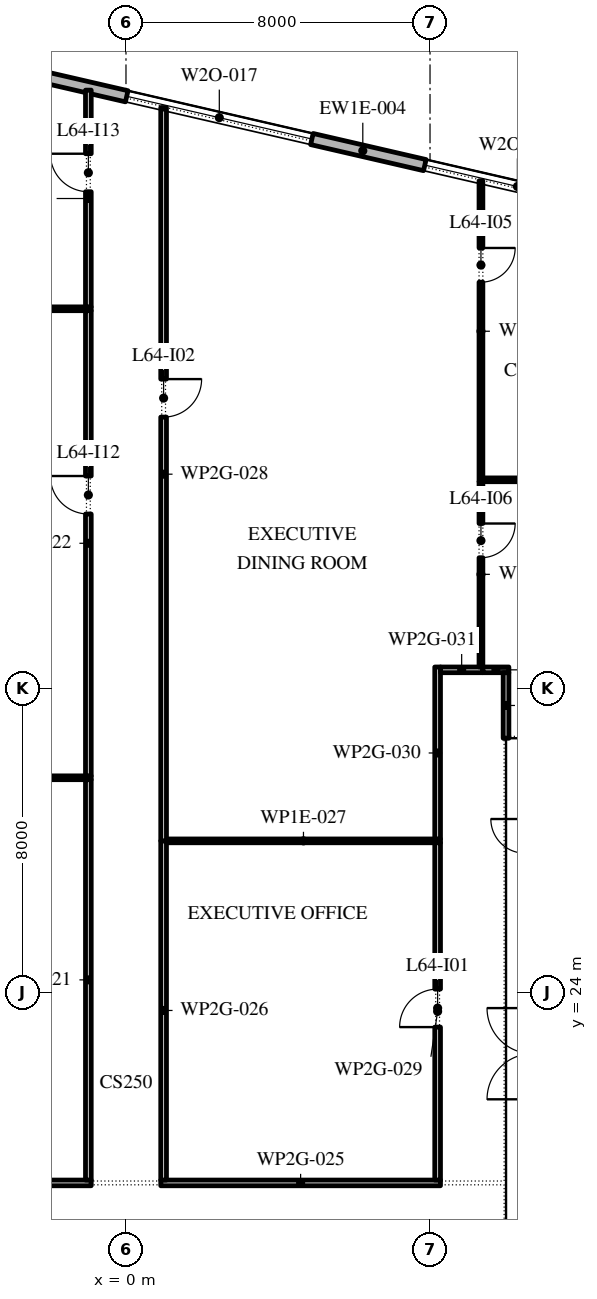
"""IFC4 building model, lengths in metres.
Left out: names, types, materials, properties, quantities, classifications, styles, units other than length and angle.
Written with IfcOpenShell. Run it as: python <this file> out.ifc"""

import sys

from ifc_helpers import new_model, si_unit, direction, frame, frame_2d, origin, place, context, subcontext, project, spatial, rectangle, extrude, element, fill, save


model = new_model("IFC4")
c1 = context("Model", 3, precision=1e-05, world=origin(), true_north=direction((0.0, 1.0)))
c2 = subcontext(c1, "Body", "Model", "MODEL_VIEW")
j1 = project(units=[si_unit("LENGTHUNIT", "METRE"), si_unit("PLANEANGLEUNIT", "RADIAN")], contexts=[c1])
p1 = place(None, origin())
s1 = spatial("IfcSite", under=j1, at=p1, CompositionType="ELEMENT")
p2 = place(p1, origin())
s2 = spatial("IfcBuilding", under=s1, at=p2, CompositionType="ELEMENT")
p3 = place(p2, frame((0.0, 0.0, 293.4)))
s3 = spatial("IfcBuildingStorey", under=s2, at=p3, CompositionType="ELEMENT", Elevation=293.4)
p4 = place(p3, frame((29.616, 40.758, 0.0), z_axis=(0.0, 0.0, 1.0), x_axis=(-0.974370532314, 0.224949029246, 0.0)))
e1 = element("IfcWall", 1, at=p4, inside=s3, PredefinedType="STANDARD", context=c2, shape_type="SweptSolid", body=[
    extrude(rectangle(XDim=48.0, YDim=0.3, at=frame_2d((24.0, 0.0))), origin(), (0.0, 0.0, 1.0), 3.75),
])
p5 = place(p4, frame((1.375, 0.0, 0.45)))
e2 = element("IfcOpeningElement", 2, at=p5, cuts=e1, PredefinedType="OPENING", context=c2, shape_type="SweptSolid", body=[
    extrude(rectangle(XDim=5.0, YDim=2.2, at=frame_2d((2.5, 1.1))), frame((0.0, 0.16, 0.0), z_axis=(0.0, -1.0, 0.0), x_axis=(1.0, 0.0, 0.0)), (0.0, 0.0, 1.0), 0.32),
])
p6 = place(p4, frame((10.575, 0.0, 0.0)))
e3 = element("IfcOpeningElement", 3, at=p6, cuts=e1, PredefinedType="OPENING", context=c2, shape_type="SweptSolid", body=[
    extrude(rectangle(XDim=2.4, YDim=2.65, at=frame_2d((1.2, 1.325))), frame((0.0, 0.16, 0.0), z_axis=(0.0, -1.0, 0.0), x_axis=(1.0, 0.0, 0.0)), (0.0, 0.0, 1.0), 0.32),
])
p7 = place(p4, frame((17.325, 0.0, 0.45)))
e4 = element("IfcOpeningElement", 4, at=p7, cuts=e1, PredefinedType="OPENING", context=c2, shape_type="SweptSolid", body=[
    extrude(rectangle(XDim=5.0, YDim=2.2, at=frame_2d((2.5, 1.1))), frame((0.0, 0.16, 0.0), z_axis=(0.0, -1.0, 0.0), x_axis=(1.0, 0.0, 0.0)), (0.0, 0.0, 1.0), 0.32),
])
p8 = place(p4, frame((25.375, 0.0, 0.45)))
e5 = element("IfcOpeningElement", 5, at=p8, cuts=e1, PredefinedType="OPENING", context=c2, shape_type="SweptSolid", body=[
    extrude(rectangle(XDim=5.0, YDim=2.2, at=frame_2d((2.5, 1.1))), frame((0.0, 0.16, 0.0), z_axis=(0.0, -1.0, 0.0), x_axis=(1.0, 0.0, 0.0)), (0.0, 0.0, 1.0), 0.32),
])
p9 = place(p4, frame((33.425, 0.0, 0.45)))
e6 = element("IfcOpeningElement", 6, at=p9, cuts=e1, PredefinedType="OPENING", context=c2, shape_type="SweptSolid", body=[
    extrude(rectangle(XDim=5.0, YDim=2.2, at=frame_2d((2.5, 1.1))), frame((0.0, 0.16, 0.0), z_axis=(0.0, -1.0, 0.0), x_axis=(1.0, 0.0, 0.0)), (0.0, 0.0, 1.0), 0.32),
])
p10 = place(p4, frame((42.175, 0.0, 0.0)))
e7 = element("IfcOpeningElement", 7, at=p10, cuts=e1, PredefinedType="OPENING", context=c2, shape_type="SweptSolid", body=[
    extrude(rectangle(XDim=2.4, YDim=3.5, at=frame_2d((1.2, 1.75))), frame((0.0, 0.16, 0.0), z_axis=(0.0, -1.0, 0.0), x_axis=(1.0, 0.0, 0.0)), (0.0, 0.0, 1.0), 0.32),
])
p11 = place(p3, frame((-14.19, 42.0, 0.0), z_axis=(0.0, 0.0, 1.0), x_axis=(1.0, 0.0, 0.0)))
e8 = element("IfcWall", 8, at=p11, inside=s3, PredefinedType="PARTITIONING", context=c2, shape_type="SweptSolid", body=[
    extrude(rectangle(XDim=13.275, YDim=0.1, at=frame_2d((6.637, 0.0))), origin(), (0.0, 0.0, 1.0), 3.75),
])
p12 = place(p3, frame((-8.275, 19.0, 0.0), z_axis=(0.0, 0.0, 1.0), x_axis=(1.0, 0.0, 0.0)))
e9 = element("IfcWall", 9, at=p12, inside=s3, PredefinedType="PARTITIONING", context=c2, shape_type="SweptSolid", body=[
    extrude(rectangle(XDim=7.36, YDim=0.15, at=frame_2d((3.68, 0.0))), origin(), (0.0, 0.0, 1.0), 3.75),
])
p13 = place(p3, frame((-8.125, 29.66, 0.0), z_axis=(0.0, 0.0, 1.0), x_axis=(1.0, 0.0, 0.0)))
e10 = element("IfcWall", 10, at=p13, inside=s3, PredefinedType="PARTITIONING", context=c2, shape_type="SweptSolid", body=[
    extrude(rectangle(XDim=7.21, YDim=0.1, at=frame_2d((3.605, 0.0))), origin(), (0.0, 0.0, 1.0), 3.75),
])
p14 = place(p3, frame((-0.99, 19.075, 0.0), z_axis=(0.0, 0.0, 1.0), x_axis=(0.0, 1.0, 0.0)))
e11 = element("IfcWall", 11, at=p14, inside=s3, PredefinedType="PARTITIONING", context=c2, shape_type="SweptSolid", body=[
    extrude(rectangle(XDim=10.535, YDim=0.15, at=frame_2d((5.268, 0.0))), origin(), (0.0, 0.0, 1.0), 3.75),
])
p15 = place(p3, frame((-0.99, 29.71, 0.0), z_axis=(0.0, 0.0, 1.0), x_axis=(0.0, 1.0, 0.0)))
e12 = element("IfcWall", 12, at=p15, inside=s3, PredefinedType="PARTITIONING", context=c2, shape_type="SweptSolid", body=[
    extrude(rectangle(XDim=12.24, YDim=0.15, at=frame_2d((6.12, 0.0))), origin(), (0.0, 0.0, 1.0), 3.75),
])
p16 = place(p15, frame((6.89, 0.0, 0.0)))
e13 = element("IfcOpeningElement", 13, at=p16, cuts=e12, PredefinedType="OPENING", context=c2, shape_type="SweptSolid", body=[
    extrude(rectangle(XDim=1.0, YDim=2.1, at=frame_2d((0.5, 1.05))), frame((0.0, 0.085, 0.0), z_axis=(0.0, -1.0, 0.0), x_axis=(1.0, 0.0, 0.0)), (0.0, 0.0, 1.0), 0.17),
])
p17 = place(p3, frame((-0.99, 42.05, 0.0), z_axis=(0.0, 0.0, 1.0), x_axis=(0.0, 1.0, 0.0)))
e14 = element("IfcWall", 14, at=p17, inside=s3, PredefinedType="PARTITIONING", context=c2, shape_type="SweptSolid", body=[
    extrude(rectangle(XDim=5.703, YDim=0.15, at=frame_2d((2.852, 0.0))), origin(), (0.0, 0.0, 1.0), 3.75),
])
p18 = place(p17, frame((3.03, 0.0, 0.0)))
e15 = element("IfcOpeningElement", 15, at=p18, cuts=e14, PredefinedType="OPENING", context=c2, shape_type="SweptSolid", body=[
    extrude(rectangle(XDim=1.0, YDim=2.1, at=frame_2d((0.5, 1.05))), frame((0.0, 0.085, 0.0), z_axis=(0.0, -1.0, 0.0), x_axis=(1.0, 0.0, 0.0)), (0.0, 0.0, 1.0), 0.17),
])
p19 = place(p3, frame((0.915, 19.0, 0.0), z_axis=(0.0, 0.0, 1.0), x_axis=(1.0, 0.0, 0.0)))
e16 = element("IfcWall", 16, at=p19, inside=s3, PredefinedType="PARTITIONING", context=c2, shape_type="SweptSolid", body=[
    extrude(rectangle(XDim=7.36, YDim=0.15, at=frame_2d((3.68, 0.0))), origin(), (0.0, 0.0, 1.0), 3.75),
])
p20 = place(p3, frame((0.99, 28.0, 0.0), z_axis=(0.0, 0.0, 1.0), x_axis=(0.0, -1.0, 0.0)))
e17 = element("IfcWall", 17, at=p20, inside=s3, PredefinedType="PARTITIONING", context=c2, shape_type="SweptSolid", body=[
    extrude(rectangle(XDim=8.925, YDim=0.15, at=frame_2d((4.462, 0.0))), origin(), (0.0, 0.0, 1.0), 3.75),
])
p21 = place(p3, frame((1.065, 28.0, 0.0), z_axis=(0.0, 0.0, 1.0), x_axis=(1.0, 0.0, 0.0)))
e18 = element("IfcWall", 18, at=p21, inside=s3, PredefinedType="PARTITIONING", context=c2, shape_type="SweptSolid", body=[
    extrude(rectangle(XDim=7.21, YDim=0.1, at=frame_2d((3.605, 0.0))), origin(), (0.0, 0.0, 1.0), 3.75),
])
p22 = place(p3, frame((0.99, 47.296, 0.0), z_axis=(0.0, 0.0, 1.0), x_axis=(0.0, -1.0, 0.0)))
e19 = element("IfcWall", 19, at=p22, inside=s3, PredefinedType="PARTITIONING", context=c2, shape_type="SweptSolid", body=[
    extrude(rectangle(XDim=19.296, YDim=0.15, at=frame_2d((9.648, 0.0))), origin(), (0.0, 0.0, 1.0), 3.75),
])
p23 = place(p22, frame((7.146, 0.0, 0.0)))
e20 = element("IfcOpeningElement", 20, at=p23, cuts=e19, PredefinedType="OPENING", context=c2, shape_type="SweptSolid", body=[
    extrude(rectangle(XDim=1.0, YDim=2.1, at=frame_2d((0.5, 1.05))), frame((0.0, 0.085, 0.0), z_axis=(0.0, -1.0, 0.0), x_axis=(1.0, 0.0, 0.0)), (0.0, 0.0, 1.0), 0.17),
])
p24 = place(p3, frame((8.2, 19.075, 0.0), z_axis=(0.0, 0.0, 1.0), x_axis=(0.0, 1.0, 0.0)))
e21 = element("IfcWall", 21, at=p24, inside=s3, PredefinedType="PARTITIONING", context=c2, shape_type="SweptSolid", body=[
    extrude(rectangle(XDim=8.875, YDim=0.15, at=frame_2d((4.438, 0.0))), origin(), (0.0, 0.0, 1.0), 3.75),
])
p25 = place(p24, frame((4.025, 0.0, 0.0)))
e22 = element("IfcOpeningElement", 22, at=p25, cuts=e21, PredefinedType="OPENING", context=c2, shape_type="SweptSolid", body=[
    extrude(rectangle(XDim=1.0, YDim=2.1, at=frame_2d((0.5, 1.05))), frame((0.0, 0.085, 0.0), z_axis=(0.0, -1.0, 0.0), x_axis=(1.0, 0.0, 0.0)), (0.0, 0.0, 1.0), 0.17),
])
p26 = place(p3, frame((8.2, 28.05, 0.0), z_axis=(0.0, 0.0, 1.0), x_axis=(0.0, 1.0, 0.0)))
e23 = element("IfcWall", 23, at=p26, inside=s3, PredefinedType="PARTITIONING", context=c2, shape_type="SweptSolid", body=[
    extrude(rectangle(XDim=4.525, YDim=0.15, at=frame_2d((2.262, 0.0))), origin(), (0.0, 0.0, 1.0), 3.75),
])
p27 = place(p3, frame((8.275, 32.5, 0.0), z_axis=(0.0, 0.0, 1.0), x_axis=(1.0, 0.0, 0.0)))
e24 = element("IfcWall", 24, at=p27, inside=s3, PredefinedType="PARTITIONING", context=c2, shape_type="SweptSolid", body=[
    extrude(rectangle(XDim=1.115, YDim=0.15, at=frame_2d((0.558, 0.0))), origin(), (0.0, 0.0, 1.0), 3.75),
])
p28 = place(p3, frame((9.39, 32.5, 0.0), z_axis=(0.0, 0.0, 1.0), x_axis=(1.0, 0.0, 0.0)))
e25 = element("IfcWall", 25, at=p28, inside=s3, PredefinedType="PARTITIONING", context=c2, shape_type="SweptSolid", body=[
    extrude(rectangle(XDim=0.685, YDim=0.15, at=frame_2d((0.343, 0.0))), origin(), (0.0, 0.0, 1.0), 3.75),
])
p29 = place(p3, frame((9.34, 37.45, 0.0), z_axis=(0.0, 0.0, 1.0), x_axis=(0.0, -1.0, 0.0)))
e26 = element("IfcWall", 26, at=p29, inside=s3, PredefinedType="PARTITIONING", context=c2, shape_type="SweptSolid", body=[
    extrude(rectangle(XDim=4.875, YDim=0.1, at=frame_2d((2.438, 0.0))), origin(), (0.0, 0.0, 1.0), 3.75),
])
p30 = place(p29, frame((1.1, 0.0, 0.0)))
e27 = element("IfcOpeningElement", 27, at=p30, cuts=e26, PredefinedType="OPENING", context=c2, shape_type="SweptSolid", body=[
    extrude(rectangle(XDim=0.9, YDim=2.1, at=frame_2d((0.45, 1.05))), frame((0.0, 0.06, 0.0), z_axis=(0.0, -1.0, 0.0), x_axis=(1.0, 0.0, 0.0)), (0.0, 0.0, 1.0), 0.12),
])
p31 = place(p3, frame((9.34, 45.368, 0.0), z_axis=(0.0, 0.0, 1.0), x_axis=(0.0, -1.0, 0.0)))
e28 = element("IfcWall", 28, at=p31, inside=s3, PredefinedType="PARTITIONING", context=c2, shape_type="SweptSolid", body=[
    extrude(rectangle(XDim=7.918, YDim=0.1, at=frame_2d((3.959, 0.0))), origin(), (0.0, 0.0, 1.0), 3.75),
])
p32 = place(p31, frame((1.768, 0.0, 0.0)))
e29 = element("IfcOpeningElement", 29, at=p32, cuts=e28, PredefinedType="OPENING", context=c2, shape_type="SweptSolid", body=[
    extrude(rectangle(XDim=0.9, YDim=2.1, at=frame_2d((0.45, 1.05))), frame((0.0, 0.06, 0.0), z_axis=(0.0, -1.0, 0.0), x_axis=(1.0, 0.0, 0.0)), (0.0, 0.0, 1.0), 0.12),
])
p33 = place(p3, frame((10.0, 32.425, 0.0), z_axis=(0.0, 0.0, 1.0), x_axis=(0.0, -1.0, 0.0)))
e30 = element("IfcWall", 30, at=p33, inside=s3, PredefinedType="PARTITIONING", context=c2, shape_type="SweptSolid", body=[
    extrude(rectangle(XDim=1.725, YDim=0.15, at=frame_2d((0.863, 0.0))), origin(), (0.0, 0.0, 1.0), 3.75),
])
p34 = place(p3, frame((22.08, 37.5, 0.0), z_axis=(0.0, 0.0, 1.0), x_axis=(-1.0, 0.0, 0.0)))
e31 = element("IfcWall", 31, at=p34, inside=s3, PredefinedType="PARTITIONING", context=c2, shape_type="SweptSolid", body=[
    extrude(rectangle(XDim=12.69, YDim=0.1, at=frame_2d((6.345, 0.0))), origin(), (0.0, 0.0, 1.0), 3.75),
])
p35 = place(p7, origin())
e32 = element("IfcWindow", 32, at=p35, inside=s3, PartitioningType="DOUBLE_PANEL_VERTICAL", PredefinedType="WINDOW", context=c2, shape_type="SweptSolid", body=[
    extrude(rectangle(XDim=5.0, YDim=2.2, at=frame_2d((2.5, 1.1))), frame((0.0, 0.03, 0.0), z_axis=(0.0, -1.0, 0.0), x_axis=(1.0, 0.0, 0.0)), (0.0, 0.0, 1.0), 0.06),
])
fill(e4, e32)
p36 = place(p8, origin())
e33 = element("IfcWindow", 33, at=p36, inside=s3, PartitioningType="DOUBLE_PANEL_VERTICAL", PredefinedType="WINDOW", context=c2, shape_type="SweptSolid", body=[
    extrude(rectangle(XDim=5.0, YDim=2.2, at=frame_2d((2.5, 1.1))), frame((0.0, 0.03, 0.0), z_axis=(0.0, -1.0, 0.0), x_axis=(1.0, 0.0, 0.0)), (0.0, 0.0, 1.0), 0.06),
])
fill(e5, e33)
p37 = place(p25, origin())
e34 = element("IfcDoor", 34, at=p37, inside=s3, OperationType="SINGLE_SWING_RIGHT", PredefinedType="DOOR", context=c2, shape_type="SweptSolid", body=[
    extrude(rectangle(XDim=1.0, YDim=2.1, at=frame_2d((0.5, 1.05))), frame((0.0, 0.025, 0.0), z_axis=(0.0, -1.0, 0.0), x_axis=(1.0, 0.0, 0.0)), (0.0, 0.0, 1.0), 0.05),
])
fill(e22, e34)
p38 = place(p23, origin())
e35 = element("IfcDoor", 35, at=p38, inside=s3, OperationType="SINGLE_SWING_RIGHT", PredefinedType="DOOR", context=c2, shape_type="SweptSolid", body=[
    extrude(rectangle(XDim=1.0, YDim=2.1, at=frame_2d((0.5, 1.05))), frame((0.0, 0.025, 0.0), z_axis=(0.0, -1.0, 0.0), x_axis=(1.0, 0.0, 0.0)), (0.0, 0.0, 1.0), 0.05),
])
fill(e20, e35)
p39 = place(p32, origin())
e36 = element("IfcDoor", 36, at=p39, inside=s3, OperationType="SINGLE_SWING_RIGHT", PredefinedType="DOOR", context=c2, shape_type="SweptSolid", body=[
    extrude(rectangle(XDim=0.9, YDim=2.1, at=frame_2d((0.45, 1.05))), frame((0.0, 0.025, 0.0), z_axis=(0.0, -1.0, 0.0), x_axis=(1.0, 0.0, 0.0)), (0.0, 0.0, 1.0), 0.05),
])
fill(e29, e36)
p40 = place(p30, origin())
e37 = element("IfcDoor", 37, at=p40, inside=s3, OperationType="SINGLE_SWING_RIGHT", PredefinedType="DOOR", context=c2, shape_type="SweptSolid", body=[
    extrude(rectangle(XDim=0.9, YDim=2.1, at=frame_2d((0.45, 1.05))), frame((0.0, 0.025, 0.0), z_axis=(0.0, -1.0, 0.0), x_axis=(1.0, 0.0, 0.0)), (0.0, 0.0, 1.0), 0.05),
])
fill(e27, e37)
p41 = place(p16, origin())
e38 = element("IfcDoor", 38, at=p41, inside=s3, OperationType="SINGLE_SWING_LEFT", PredefinedType="DOOR", context=c2, shape_type="SweptSolid", body=[
    extrude(rectangle(XDim=1.0, YDim=2.1, at=frame_2d((0.5, 1.05))), frame((0.0, 0.025, 0.0), z_axis=(0.0, -1.0, 0.0), x_axis=(1.0, 0.0, 0.0)), (0.0, 0.0, 1.0), 0.05),
])
fill(e13, e38)
p42 = place(p18, origin())
e39 = element("IfcDoor", 39, at=p42, inside=s3, OperationType="SINGLE_SWING_LEFT", PredefinedType="DOOR", context=c2, shape_type="SweptSolid", body=[
    extrude(rectangle(XDim=1.0, YDim=2.1, at=frame_2d((0.5, 1.05))), frame((0.0, 0.025, 0.0), z_axis=(0.0, -1.0, 0.0), x_axis=(1.0, 0.0, 0.0)), (0.0, 0.0, 1.0), 0.05),
])
fill(e15, e39)
save(model, sys.argv[1])
